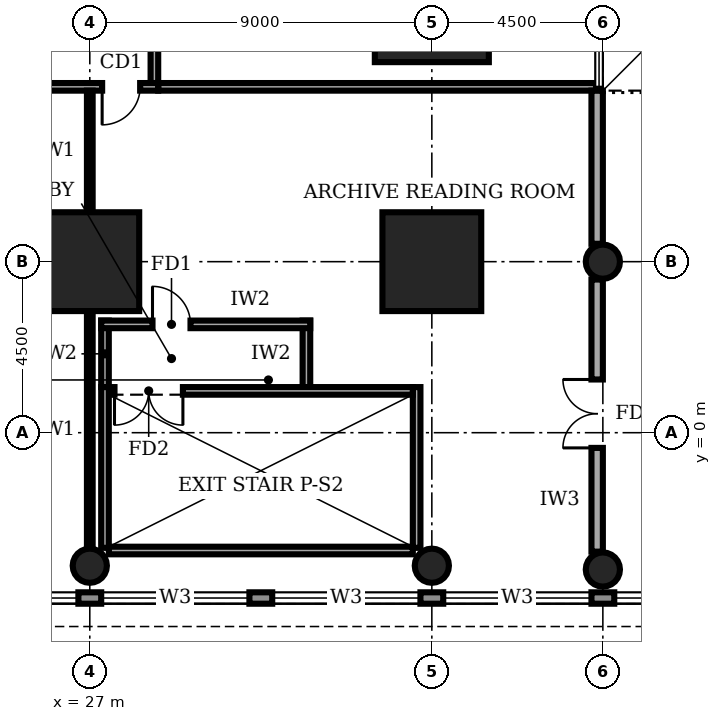
"""IFC4 building model, lengths in metres.
Left out: names, types, materials, properties, quantities, classifications, styles, units other than length and angle.
Written with IfcOpenShell. Run it as: python <this file> out.ifc"""

import sys

from ifc_helpers import new_model, si_unit, direction, frame, frame_2d, origin, origin_2d, place, context, subcontext, project, spatial, rectangle, circle, extrude, element, fill, save


model = new_model("IFC4")
c1 = context("Model", 3, precision=1e-05, world=origin(), true_north=direction((0.0, 1.0)))
c2 = subcontext(c1, "Body", "Model", "MODEL_VIEW")
j1 = project(units=[si_unit("LENGTHUNIT", "METRE"), si_unit("PLANEANGLEUNIT", "RADIAN")], contexts=[c1])
p1 = place(None, origin())
s1 = spatial("IfcSite", under=j1, at=p1, CompositionType="ELEMENT")
p2 = place(p1, origin())
s2 = spatial("IfcBuilding", under=s1, at=p2, CompositionType="ELEMENT")
p3 = place(p2, frame((0.0, 0.0, 16.0)))
s3 = spatial("IfcBuildingStorey", under=s2, at=p3, CompositionType="ELEMENT", Elevation=16.0)
for number, where, z_axis, x_axis in (
    (1, (27.0, 4.5, 0.0), (0.0, 0.0, 1.0), (1.0, 0.0, 0.0)),
    (2, (36.0, 4.5, 0.0), (0.0, 0.0, 1.0), (1.0, 0.0, 0.0)),
):
    element("IfcColumn", number, at=place(p3, frame(where, z_axis=z_axis, x_axis=x_axis)), inside=s3, PredefinedType="COLUMN", context=c2, shape_type="SweptSolid", body=[
        extrude(rectangle(XDim=2.6, YDim=2.6, at=origin_2d()), origin(), (0.0, 0.0, 1.0), 5.0),
    ])
p4 = place(p3, frame((36.0, 11.25, 0.0), z_axis=(0.0, 0.0, 1.0), x_axis=(1.0, 0.0, 0.0)))
e3 = element("IfcColumn", 3, at=p4, inside=s3, PredefinedType="COLUMN", context=c2, shape_type="SweptSolid", body=[
    extrude(rectangle(XDim=3.0, YDim=3.0, at=origin_2d()), origin(), (0.0, 0.0, 1.0), 5.0),
])
for number, where, z_axis, x_axis in (
    (4, (27.0, -3.5, 0.0), (0.0, 0.0, 1.0), (1.0, 0.0, 0.0)),
    (5, (36.0, -3.5, 0.0), (0.0, 0.0, 1.0), (1.0, 0.0, 0.0)),
    (6, (40.5, -3.6, 0.0), (0.0, 0.0, 1.0), (1.0, 0.0, 0.0)),
    (7, (40.5, 4.5, 0.0), (0.0, 0.0, 1.0), (1.0, 0.0, 0.0)),
):
    element("IfcColumn", number, at=place(p3, frame(where, z_axis=z_axis, x_axis=x_axis)), inside=s3, PredefinedType="COLUMN", context=c2, shape_type="SweptSolid", body=[
        extrude(circle(Radius=0.45, at=origin_2d()), origin(), (0.0, 0.0, 1.0), 5.0),
    ])
p5 = place(p3, frame((0.02, -4.35, 0.0), z_axis=(0.0, 0.0, 1.0), x_axis=(1.0, 0.0, 0.0)))
e8 = element("IfcWall", 8, at=p5, inside=s3, PredefinedType="STANDARD", context=c2, shape_type="SweptSolid", body=[
    extrude(rectangle(XDim=98.96, YDim=0.3, at=frame_2d((49.48, 0.0))), origin(), (0.0, 0.0, 1.0), 4.7),
])
p6 = place(p5, frame((4.78, 0.0, 0.95)))
e9 = element("IfcOpeningElement", 9, at=p6, cuts=e8, PredefinedType="OPENING", context=c2, shape_type="SweptSolid", body=[
    extrude(rectangle(XDim=3.9, YDim=1.8, at=frame_2d((1.95, 0.9))), frame((0.0, 0.16, 0.0), z_axis=(0.0, -1.0, 0.0), x_axis=(1.0, 0.0, 0.0)), (0.0, 0.0, 1.0), 0.32),
])
p7 = place(p5, frame((9.28, 0.0, 0.95)))
e10 = element("IfcOpeningElement", 10, at=p7, cuts=e8, PredefinedType="OPENING", context=c2, shape_type="SweptSolid", body=[
    extrude(rectangle(XDim=3.9, YDim=1.8, at=frame_2d((1.95, 0.9))), frame((0.0, 0.16, 0.0), z_axis=(0.0, -1.0, 0.0), x_axis=(1.0, 0.0, 0.0)), (0.0, 0.0, 1.0), 0.32),
])
p8 = place(p5, frame((13.78, 0.0, 0.95)))
e11 = element("IfcOpeningElement", 11, at=p8, cuts=e8, PredefinedType="OPENING", context=c2, shape_type="SweptSolid", body=[
    extrude(rectangle(XDim=3.9, YDim=1.8, at=frame_2d((1.95, 0.9))), frame((0.0, 0.16, 0.0), z_axis=(0.0, -1.0, 0.0), x_axis=(1.0, 0.0, 0.0)), (0.0, 0.0, 1.0), 0.32),
])
p9 = place(p5, frame((18.28, 0.0, 0.95)))
e12 = element("IfcOpeningElement", 12, at=p9, cuts=e8, PredefinedType="OPENING", context=c2, shape_type="SweptSolid", body=[
    extrude(rectangle(XDim=3.9, YDim=1.8, at=frame_2d((1.95, 0.9))), frame((0.0, 0.16, 0.0), z_axis=(0.0, -1.0, 0.0), x_axis=(1.0, 0.0, 0.0)), (0.0, 0.0, 1.0), 0.32),
])
p10 = place(p5, frame((22.78, 0.0, 0.95)))
e13 = element("IfcOpeningElement", 13, at=p10, cuts=e8, PredefinedType="OPENING", context=c2, shape_type="SweptSolid", body=[
    extrude(rectangle(XDim=3.9, YDim=1.8, at=frame_2d((1.95, 0.9))), frame((0.0, 0.16, 0.0), z_axis=(0.0, -1.0, 0.0), x_axis=(1.0, 0.0, 0.0)), (0.0, 0.0, 1.0), 0.32),
])
p11 = place(p5, frame((27.28, 0.0, 0.95)))
e14 = element("IfcOpeningElement", 14, at=p11, cuts=e8, PredefinedType="OPENING", context=c2, shape_type="SweptSolid", body=[
    extrude(rectangle(XDim=3.9, YDim=1.8, at=frame_2d((1.95, 0.9))), frame((0.0, 0.16, 0.0), z_axis=(0.0, -1.0, 0.0), x_axis=(1.0, 0.0, 0.0)), (0.0, 0.0, 1.0), 0.32),
])
p12 = place(p5, frame((31.78, 0.0, 0.95)))
e15 = element("IfcOpeningElement", 15, at=p12, cuts=e8, PredefinedType="OPENING", context=c2, shape_type="SweptSolid", body=[
    extrude(rectangle(XDim=3.9, YDim=1.8, at=frame_2d((1.95, 0.9))), frame((0.0, 0.16, 0.0), z_axis=(0.0, -1.0, 0.0), x_axis=(1.0, 0.0, 0.0)), (0.0, 0.0, 1.0), 0.32),
])
p13 = place(p5, frame((36.28, 0.0, 0.95)))
e16 = element("IfcOpeningElement", 16, at=p13, cuts=e8, PredefinedType="OPENING", context=c2, shape_type="SweptSolid", body=[
    extrude(rectangle(XDim=3.9, YDim=1.8, at=frame_2d((1.95, 0.9))), frame((0.0, 0.16, 0.0), z_axis=(0.0, -1.0, 0.0), x_axis=(1.0, 0.0, 0.0)), (0.0, 0.0, 1.0), 0.32),
])
p14 = place(p5, frame((40.78, 0.0, 0.95)))
e17 = element("IfcOpeningElement", 17, at=p14, cuts=e8, PredefinedType="OPENING", context=c2, shape_type="SweptSolid", body=[
    extrude(rectangle(XDim=3.9, YDim=1.8, at=frame_2d((1.95, 0.9))), frame((0.0, 0.16, 0.0), z_axis=(0.0, -1.0, 0.0), x_axis=(1.0, 0.0, 0.0)), (0.0, 0.0, 1.0), 0.32),
])
p15 = place(p5, frame((45.28, 0.0, 0.95)))
e18 = element("IfcOpeningElement", 18, at=p15, cuts=e8, PredefinedType="OPENING", context=c2, shape_type="SweptSolid", body=[
    extrude(rectangle(XDim=3.9, YDim=1.8, at=frame_2d((1.95, 0.9))), frame((0.0, 0.16, 0.0), z_axis=(0.0, -1.0, 0.0), x_axis=(1.0, 0.0, 0.0)), (0.0, 0.0, 1.0), 0.32),
])
p16 = place(p5, frame((49.78, 0.0, 0.95)))
e19 = element("IfcOpeningElement", 19, at=p16, cuts=e8, PredefinedType="OPENING", context=c2, shape_type="SweptSolid", body=[
    extrude(rectangle(XDim=3.9, YDim=1.8, at=frame_2d((1.95, 0.9))), frame((0.0, 0.16, 0.0), z_axis=(0.0, -1.0, 0.0), x_axis=(1.0, 0.0, 0.0)), (0.0, 0.0, 1.0), 0.32),
])
p17 = place(p5, frame((54.28, 0.0, 0.95)))
e20 = element("IfcOpeningElement", 20, at=p17, cuts=e8, PredefinedType="OPENING", context=c2, shape_type="SweptSolid", body=[
    extrude(rectangle(XDim=3.9, YDim=1.8, at=frame_2d((1.95, 0.9))), frame((0.0, 0.16, 0.0), z_axis=(0.0, -1.0, 0.0), x_axis=(1.0, 0.0, 0.0)), (0.0, 0.0, 1.0), 0.32),
])
p18 = place(p5, frame((58.78, 0.0, 0.95)))
e21 = element("IfcOpeningElement", 21, at=p18, cuts=e8, PredefinedType="OPENING", context=c2, shape_type="SweptSolid", body=[
    extrude(rectangle(XDim=3.9, YDim=1.8, at=frame_2d((1.95, 0.9))), frame((0.0, 0.16, 0.0), z_axis=(0.0, -1.0, 0.0), x_axis=(1.0, 0.0, 0.0)), (0.0, 0.0, 1.0), 0.32),
])
p19 = place(p5, frame((63.28, 0.0, 0.95)))
e22 = element("IfcOpeningElement", 22, at=p19, cuts=e8, PredefinedType="OPENING", context=c2, shape_type="SweptSolid", body=[
    extrude(rectangle(XDim=3.9, YDim=1.8, at=frame_2d((1.95, 0.9))), frame((0.0, 0.16, 0.0), z_axis=(0.0, -1.0, 0.0), x_axis=(1.0, 0.0, 0.0)), (0.0, 0.0, 1.0), 0.32),
])
p20 = place(p5, frame((67.78, 0.0, 0.95)))
e23 = element("IfcOpeningElement", 23, at=p20, cuts=e8, PredefinedType="OPENING", context=c2, shape_type="SweptSolid", body=[
    extrude(rectangle(XDim=3.9, YDim=1.8, at=frame_2d((1.95, 0.9))), frame((0.0, 0.16, 0.0), z_axis=(0.0, -1.0, 0.0), x_axis=(1.0, 0.0, 0.0)), (0.0, 0.0, 1.0), 0.32),
])
p21 = place(p5, frame((72.28, 0.0, 0.95)))
e24 = element("IfcOpeningElement", 24, at=p21, cuts=e8, PredefinedType="OPENING", context=c2, shape_type="SweptSolid", body=[
    extrude(rectangle(XDim=3.9, YDim=1.8, at=frame_2d((1.95, 0.9))), frame((0.0, 0.16, 0.0), z_axis=(0.0, -1.0, 0.0), x_axis=(1.0, 0.0, 0.0)), (0.0, 0.0, 1.0), 0.32),
])
p22 = place(p5, frame((76.78, 0.0, 0.95)))
e25 = element("IfcOpeningElement", 25, at=p22, cuts=e8, PredefinedType="OPENING", context=c2, shape_type="SweptSolid", body=[
    extrude(rectangle(XDim=3.9, YDim=1.8, at=frame_2d((1.95, 0.9))), frame((0.0, 0.16, 0.0), z_axis=(0.0, -1.0, 0.0), x_axis=(1.0, 0.0, 0.0)), (0.0, 0.0, 1.0), 0.32),
])
p23 = place(p5, frame((81.28, 0.0, 0.95)))
e26 = element("IfcOpeningElement", 26, at=p23, cuts=e8, PredefinedType="OPENING", context=c2, shape_type="SweptSolid", body=[
    extrude(rectangle(XDim=3.9, YDim=1.8, at=frame_2d((1.95, 0.9))), frame((0.0, 0.16, 0.0), z_axis=(0.0, -1.0, 0.0), x_axis=(1.0, 0.0, 0.0)), (0.0, 0.0, 1.0), 0.32),
])
p24 = place(p5, frame((85.78, 0.0, 0.95)))
e27 = element("IfcOpeningElement", 27, at=p24, cuts=e8, PredefinedType="OPENING", context=c2, shape_type="SweptSolid", body=[
    extrude(rectangle(XDim=3.9, YDim=1.8, at=frame_2d((1.95, 0.9))), frame((0.0, 0.16, 0.0), z_axis=(0.0, -1.0, 0.0), x_axis=(1.0, 0.0, 0.0)), (0.0, 0.0, 1.0), 0.32),
])
p25 = place(p5, frame((90.28, 0.0, 0.95)))
e28 = element("IfcOpeningElement", 28, at=p25, cuts=e8, PredefinedType="OPENING", context=c2, shape_type="SweptSolid", body=[
    extrude(rectangle(XDim=3.9, YDim=1.8, at=frame_2d((1.95, 0.9))), frame((0.0, 0.16, 0.0), z_axis=(0.0, -1.0, 0.0), x_axis=(1.0, 0.0, 0.0)), (0.0, 0.0, 1.0), 0.32),
])
p26 = place(p5, frame((94.78, 0.0, 0.95)))
e29 = element("IfcOpeningElement", 29, at=p26, cuts=e8, PredefinedType="OPENING", context=c2, shape_type="SweptSolid", body=[
    extrude(rectangle(XDim=3.9, YDim=1.8, at=frame_2d((1.95, 0.9))), frame((0.0, 0.16, 0.0), z_axis=(0.0, -1.0, 0.0), x_axis=(1.0, 0.0, 0.0)), (0.0, 0.0, 1.0), 0.32),
])
p27 = place(p3, frame((11.9, 9.1, 0.0), z_axis=(0.0, 0.0, 1.0), x_axis=(1.0, 0.0, 0.0)))
e30 = element("IfcWall", 30, at=p27, inside=s3, PredefinedType="SOLIDWALL", context=c2, shape_type="SweptSolid", body=[
    extrude(rectangle(XDim=16.9, YDim=0.2, at=frame_2d((8.45, 0.0))), origin(), (0.0, 0.0, 1.0), 4.7),
])
p28 = place(p27, frame((0.275, 0.0, 0.0)))
e31 = element("IfcOpeningElement", 31, at=p28, cuts=e30, PredefinedType="OPENING", context=c2, shape_type="SweptSolid", body=[
    extrude(rectangle(XDim=1.0, YDim=2.1, at=frame_2d((0.5, 1.05))), frame((0.0, 0.11, 0.0), z_axis=(0.0, -1.0, 0.0), x_axis=(1.0, 0.0, 0.0)), (0.0, 0.0, 1.0), 0.22),
])
p29 = place(p27, frame((3.35, 0.0, 0.0)))
e32 = element("IfcOpeningElement", 32, at=p29, cuts=e30, PredefinedType="OPENING", context=c2, shape_type="SweptSolid", body=[
    extrude(rectangle(XDim=1.0, YDim=2.1, at=frame_2d((0.5, 1.05))), frame((0.0, 0.11, 0.0), z_axis=(0.0, -1.0, 0.0), x_axis=(1.0, 0.0, 0.0)), (0.0, 0.0, 1.0), 0.22),
])
p30 = place(p27, frame((9.7, 0.0, 0.0)))
e33 = element("IfcOpeningElement", 33, at=p30, cuts=e30, PredefinedType="OPENING", context=c2, shape_type="SweptSolid", body=[
    extrude(rectangle(XDim=1.8, YDim=2.1, at=frame_2d((0.9, 1.05))), frame((0.0, 0.11, 0.0), z_axis=(0.0, -1.0, 0.0), x_axis=(1.0, 0.0, 0.0)), (0.0, 0.0, 1.0), 0.22),
])
p31 = place(p27, frame((15.425, 0.0, 0.0)))
e34 = element("IfcOpeningElement", 34, at=p31, cuts=e30, PredefinedType="OPENING", context=c2, shape_type="SweptSolid", body=[
    extrude(rectangle(XDim=1.0, YDim=2.1, at=frame_2d((0.5, 1.05))), frame((0.0, 0.11, 0.0), z_axis=(0.0, -1.0, 0.0), x_axis=(1.0, 0.0, 0.0)), (0.0, 0.0, 1.0), 0.22),
])
p32 = place(p3, frame((28.7, 9.2, 0.0), z_axis=(0.0, 0.0, 1.0), x_axis=(0.0, 1.0, 0.0)))
e35 = element("IfcWall", 35, at=p32, inside=s3, PredefinedType="SOLIDWALL", context=c2, shape_type="SweptSolid", body=[
    extrude(rectangle(XDim=22.3, YDim=0.2, at=frame_2d((11.15, 0.0))), origin(), (0.0, 0.0, 1.0), 4.7),
])
p33 = place(p32, frame((3.4, 0.0, 0.0)))
e36 = element("IfcOpeningElement", 36, at=p33, cuts=e35, PredefinedType="OPENING", context=c2, shape_type="SweptSolid", body=[
    extrude(rectangle(XDim=1.8, YDim=2.1, at=frame_2d((0.9, 1.05))), frame((0.0, 0.11, 0.0), z_axis=(0.0, -1.0, 0.0), x_axis=(1.0, 0.0, 0.0)), (0.0, 0.0, 1.0), 0.22),
])
p34 = place(p32, frame((14.65, 0.0, 0.0)))
e37 = element("IfcOpeningElement", 37, at=p34, cuts=e35, PredefinedType="OPENING", context=c2, shape_type="SweptSolid", body=[
    extrude(rectangle(XDim=1.8, YDim=2.1, at=frame_2d((0.9, 1.05))), frame((0.0, 0.11, 0.0), z_axis=(0.0, -1.0, 0.0), x_axis=(1.0, 0.0, 0.0)), (0.0, 0.0, 1.0), 0.22),
])
p35 = place(p3, frame((28.8, 9.1, 0.0), z_axis=(0.0, 0.0, 1.0), x_axis=(1.0, 0.0, 0.0)))
e38 = element("IfcWall", 38, at=p35, inside=s3, PredefinedType="SOLIDWALL", context=c2, shape_type="SweptSolid", body=[
    extrude(rectangle(XDim=11.52, YDim=0.2, at=frame_2d((5.76, 0.0))), origin(), (0.0, 0.0, 1.0), 4.7),
])
p36 = place(p3, frame((27.0, -3.03, 0.0), z_axis=(0.0, 0.0, 1.0), x_axis=(0.0, 1.0, 0.0)))
e39 = element("IfcWall", 39, at=p36, inside=s3, PredefinedType="PARTITIONING", context=c2, shape_type="SweptSolid", body=[
    extrude(rectangle(XDim=6.21, YDim=0.15, at=frame_2d((3.105, 0.0))), origin(), (0.0, 0.0, 1.0), 3.7),
])
p37 = place(p3, frame((27.0, 5.82, 0.0), z_axis=(0.0, 0.0, 1.0), x_axis=(0.0, 1.0, 0.0)))
e40 = element("IfcWall", 40, at=p37, inside=s3, PredefinedType="PARTITIONING", context=c2, shape_type="SweptSolid", body=[
    extrude(rectangle(XDim=3.18, YDim=0.15, at=frame_2d((1.59, 0.0))), origin(), (0.0, 0.0, 1.0), 3.8),
])
p38 = place(p3, frame((27.5, 1.1, 0.0), z_axis=(0.0, 0.0, 1.0), x_axis=(1.0, 0.0, 0.0)))
e41 = element("IfcWall", 41, at=p38, inside=s3, PredefinedType="SOLIDWALL", context=c2, shape_type="SweptSolid", body=[
    extrude(rectangle(XDim=8.0, YDim=0.2, at=frame_2d((4.0, 0.0))), origin(), (0.0, 0.0, 1.0), 4.7),
])
p39 = place(p38, frame((0.15, 0.0, 0.0)))
e42 = element("IfcOpeningElement", 42, at=p39, cuts=e41, PredefinedType="OPENING", context=c2, shape_type="SweptSolid", body=[
    extrude(rectangle(XDim=1.8, YDim=2.1, at=frame_2d((0.9, 1.05))), frame((0.0, 0.11, 0.0), z_axis=(0.0, -1.0, 0.0), x_axis=(1.0, 0.0, 0.0)), (0.0, 0.0, 1.0), 0.22),
])
p40 = place(p3, frame((27.5, -3.1, 0.0), z_axis=(0.0, 0.0, 1.0), x_axis=(1.0, 0.0, 0.0)))
e43 = element("IfcWall", 43, at=p40, inside=s3, PredefinedType="SOLIDWALL", context=c2, shape_type="SweptSolid", body=[
    extrude(rectangle(XDim=8.0, YDim=0.2, at=frame_2d((4.0, 0.0))), origin(), (0.0, 0.0, 1.0), 4.7),
])
for number, where, z_axis, x_axis in (
    (44, (27.4, -3.03, 0.0), (0.0, 0.0, 1.0), (0.0, 1.0, 0.0)),
    (45, (35.6, -3.03, 0.0), (0.0, 0.0, 1.0), (0.0, 1.0, 0.0)),
):
    element("IfcWall", number, at=place(p3, frame(where, z_axis=z_axis, x_axis=x_axis)), inside=s3, PredefinedType="SOLIDWALL", context=c2, shape_type="SweptSolid", body=[
        extrude(rectangle(XDim=4.23, YDim=0.2, at=frame_2d((2.115, 0.0))), origin(), (0.0, 0.0, 1.0), 4.7),
    ])
p41 = place(p3, frame((40.35, -3.13, 0.0), z_axis=(0.0, 0.0, 1.0), x_axis=(0.0, 1.0, 0.0)))
e46 = element("IfcWall", 46, at=p41, inside=s3, PredefinedType="SOLIDWALL", context=c2, shape_type="SweptSolid", body=[
    extrude(rectangle(XDim=7.16, YDim=0.3, at=frame_2d((3.58, 0.0))), origin(), (0.0, 0.0, 1.0), 3.7),
])
p42 = place(p41, frame((2.73, 0.0, 0.0)))
e47 = element("IfcOpeningElement", 47, at=p42, cuts=e46, PredefinedType="OPENING", context=c2, shape_type="SweptSolid", body=[
    extrude(rectangle(XDim=1.8, YDim=2.1, at=frame_2d((0.9, 1.05))), frame((0.0, 0.16, 0.0), z_axis=(0.0, -1.0, 0.0), x_axis=(1.0, 0.0, 0.0)), (0.0, 0.0, 1.0), 0.32),
])
p43 = place(p3, frame((40.35, 4.97, 0.0), z_axis=(0.0, 0.0, 1.0), x_axis=(0.0, 1.0, 0.0)))
e48 = element("IfcWall", 48, at=p43, inside=s3, PredefinedType="SOLIDWALL", context=c2, shape_type="SweptSolid", body=[
    extrude(rectangle(XDim=4.03, YDim=0.3, at=frame_2d((2.015, 0.0))), origin(), (0.0, 0.0, 1.0), 4.7),
])
p44 = place(p3, frame((27.4, 1.2, 0.0), z_axis=(0.0, 0.0, 1.0), x_axis=(0.0, 1.0, 0.0)))
e49 = element("IfcWall", 49, at=p44, inside=s3, PredefinedType="SOLIDWALL", context=c2, shape_type="SweptSolid", body=[
    extrude(rectangle(XDim=1.75, YDim=0.2, at=frame_2d((0.875, 0.0))), origin(), (0.0, 0.0, 1.0), 3.7),
])
p45 = place(p3, frame((32.7, 1.2, 0.0), z_axis=(0.0, 0.0, 1.0), x_axis=(0.0, 1.0, 0.0)))
e50 = element("IfcWall", 50, at=p45, inside=s3, PredefinedType="SOLIDWALL", context=c2, shape_type="SweptSolid", body=[
    extrude(rectangle(XDim=1.75, YDim=0.2, at=frame_2d((0.875, 0.0))), origin(), (0.0, 0.0, 1.0), 4.7),
])
p46 = place(p3, frame((27.3, 2.85, 0.0), z_axis=(0.0, 0.0, 1.0), x_axis=(1.0, 0.0, 0.0)))
e51 = element("IfcWall", 51, at=p46, inside=s3, PredefinedType="SOLIDWALL", context=c2, shape_type="SweptSolid", body=[
    extrude(rectangle(XDim=5.5, YDim=0.2, at=frame_2d((2.75, 0.0))), origin(), (0.0, 0.0, 1.0), 4.7),
])
p47 = place(p46, frame((1.35, 0.0, 0.0)))
e52 = element("IfcOpeningElement", 52, at=p47, cuts=e51, PredefinedType="OPENING", context=c2, shape_type="SweptSolid", body=[
    extrude(rectangle(XDim=1.0, YDim=2.1, at=frame_2d((0.5, 1.05))), frame((0.0, 0.11, 0.0), z_axis=(0.0, -1.0, 0.0), x_axis=(1.0, 0.0, 0.0)), (0.0, 0.0, 1.0), 0.22),
])
p48 = place(p10, origin())
e53 = element("IfcWindow", 53, at=p48, inside=s3, PartitioningType="SINGLE_PANEL", PredefinedType="WINDOW", context=c2, shape_type="SweptSolid", body=[
    extrude(rectangle(XDim=3.9, YDim=1.8, at=frame_2d((1.95, 0.9))), frame((0.0, 0.03, 0.0), z_axis=(0.0, -1.0, 0.0), x_axis=(1.0, 0.0, 0.0)), (0.0, 0.0, 1.0), 0.06),
])
fill(e13, e53)
p49 = place(p11, origin())
e54 = element("IfcWindow", 54, at=p49, inside=s3, PartitioningType="SINGLE_PANEL", PredefinedType="WINDOW", context=c2, shape_type="SweptSolid", body=[
    extrude(rectangle(XDim=3.9, YDim=1.8, at=frame_2d((1.95, 0.9))), frame((0.0, 0.03, 0.0), z_axis=(0.0, -1.0, 0.0), x_axis=(1.0, 0.0, 0.0)), (0.0, 0.0, 1.0), 0.06),
])
fill(e14, e54)
p50 = place(p12, origin())
e55 = element("IfcWindow", 55, at=p50, inside=s3, PartitioningType="SINGLE_PANEL", PredefinedType="WINDOW", context=c2, shape_type="SweptSolid", body=[
    extrude(rectangle(XDim=3.9, YDim=1.8, at=frame_2d((1.95, 0.9))), frame((0.0, 0.03, 0.0), z_axis=(0.0, -1.0, 0.0), x_axis=(1.0, 0.0, 0.0)), (0.0, 0.0, 1.0), 0.06),
])
fill(e15, e55)
p51 = place(p13, origin())
e56 = element("IfcWindow", 56, at=p51, inside=s3, PartitioningType="SINGLE_PANEL", PredefinedType="WINDOW", context=c2, shape_type="SweptSolid", body=[
    extrude(rectangle(XDim=3.9, YDim=1.8, at=frame_2d((1.95, 0.9))), frame((0.0, 0.03, 0.0), z_axis=(0.0, -1.0, 0.0), x_axis=(1.0, 0.0, 0.0)), (0.0, 0.0, 1.0), 0.06),
])
fill(e16, e56)
p52 = place(p14, origin())
e57 = element("IfcWindow", 57, at=p52, inside=s3, PartitioningType="SINGLE_PANEL", PredefinedType="WINDOW", context=c2, shape_type="SweptSolid", body=[
    extrude(rectangle(XDim=3.9, YDim=1.8, at=frame_2d((1.95, 0.9))), frame((0.0, 0.03, 0.0), z_axis=(0.0, -1.0, 0.0), x_axis=(1.0, 0.0, 0.0)), (0.0, 0.0, 1.0), 0.06),
])
fill(e17, e57)
p53 = place(p31, frame((1.0, 0.0, 0.0), z_axis=(0.0, 0.0, 1.0), x_axis=(-1.0, 0.0, 0.0)))
e58 = element("IfcDoor", 58, at=p53, inside=s3, OperationType="SINGLE_SWING_RIGHT", PredefinedType="DOOR", context=c2, shape_type="SweptSolid", body=[
    extrude(rectangle(XDim=1.0, YDim=2.1, at=frame_2d((0.5, 1.05))), frame((0.0, 0.025, 0.0), z_axis=(0.0, -1.0, 0.0), x_axis=(1.0, 0.0, 0.0)), (0.0, 0.0, 1.0), 0.05),
])
fill(e34, e58)
p54 = place(p39, frame((1.8, 0.0, 0.0), z_axis=(0.0, 0.0, 1.0), x_axis=(-1.0, 0.0, 0.0)))
e59 = element("IfcDoor", 59, at=p54, inside=s3, OperationType="DOUBLE_DOOR_SINGLE_SWING", PredefinedType="DOOR", context=c2, shape_type="SweptSolid", body=[
    extrude(rectangle(XDim=1.8, YDim=2.1, at=frame_2d((0.9, 1.05))), frame((0.0, 0.025, 0.0), z_axis=(0.0, -1.0, 0.0), x_axis=(1.0, 0.0, 0.0)), (0.0, 0.0, 1.0), 0.05),
])
fill(e42, e59)
p55 = place(p42, origin())
e60 = element("IfcDoor", 60, at=p55, inside=s3, OperationType="DOUBLE_DOOR_SINGLE_SWING", PredefinedType="DOOR", context=c2, shape_type="SweptSolid", body=[
    extrude(rectangle(XDim=1.8, YDim=2.1, at=frame_2d((0.9, 1.05))), frame((0.0, 0.025, 0.0), z_axis=(0.0, -1.0, 0.0), x_axis=(1.0, 0.0, 0.0)), (0.0, 0.0, 1.0), 0.05),
])
fill(e47, e60)
p56 = place(p47, origin())
e61 = element("IfcDoor", 61, at=p56, inside=s3, OperationType="SINGLE_SWING_LEFT", PredefinedType="DOOR", context=c2, shape_type="SweptSolid", body=[
    extrude(rectangle(XDim=1.0, YDim=2.1, at=frame_2d((0.5, 1.05))), frame((0.0, 0.025, 0.0), z_axis=(0.0, -1.0, 0.0), x_axis=(1.0, 0.0, 0.0)), (0.0, 0.0, 1.0), 0.05),
])
fill(e52, e61)
save(model, sys.argv[1])
